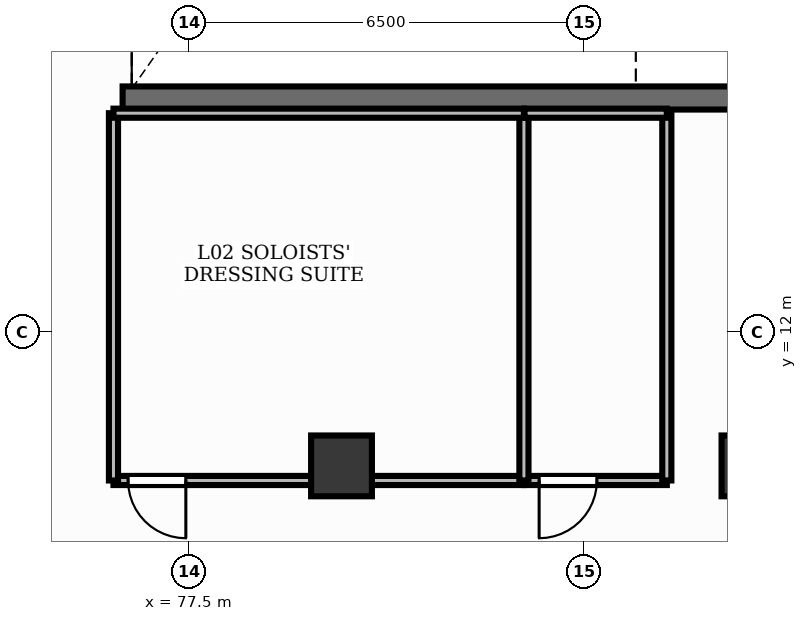
"""IFC4 building model, lengths in metres.
Left out: names, types, materials, properties, quantities, classifications, styles, units other than length and angle.
Written with IfcOpenShell. Run it as: python <this file> out.ifc"""

import sys

from ifc_helpers import new_model, si_unit, direction, frame, frame_2d, origin, origin_2d, place, context, subcontext, project, spatial, rectangle, extrude, element, fill, save


model = new_model("IFC4")
c1 = context("Model", 3, precision=1e-05, world=origin(), true_north=direction((0.0, 1.0)))
c2 = subcontext(c1, "Body", "Model", "MODEL_VIEW")
j1 = project(units=[si_unit("LENGTHUNIT", "METRE"), si_unit("PLANEANGLEUNIT", "RADIAN")], contexts=[c1])
p1 = place(None, origin())
s1 = spatial("IfcSite", under=j1, at=p1, CompositionType="ELEMENT")
p2 = place(p1, origin())
s2 = spatial("IfcBuilding", under=s1, at=p2, CompositionType="ELEMENT")
p3 = place(p2, frame((0.0, 0.0, 10.2)))
s3 = spatial("IfcBuildingStorey", under=s2, at=p3, CompositionType="ELEMENT", Elevation=10.2)
for number, where, z_axis, x_axis in (
    (1, (80.0, 9.8, 0.0), (0.0, 0.0, 1.0), (1.0, 0.0, 0.0)),
    (2, (86.75, 9.8, 0.0), (0.0, 0.0, 1.0), (1.0, 0.0, 0.0)),
):
    element("IfcColumn", number, at=place(p3, frame(where, z_axis=z_axis, x_axis=x_axis)), inside=s3, PredefinedType="COLUMN", context=c2, shape_type="SweptSolid", body=[
        extrude(rectangle(XDim=1.0, YDim=1.0, at=origin_2d()), origin(), (0.0, 0.0, 1.0), 4.5),
    ])
p4 = place(p3, frame((76.4, 15.85, 0.0), z_axis=(0.0, 0.0, 1.0), x_axis=(1.0, 0.0, 0.0)))
e3 = element("IfcWall", 3, at=p4, inside=s3, PredefinedType="SHEAR", context=c2, shape_type="SweptSolid", body=[
    extrude(rectangle(XDim=15.75, YDim=0.38, at=frame_2d((7.875, 0.0))), origin(), (0.0, 0.0, 1.0), 4.5),
])
p5 = place(p3, frame((83.0, 9.56, 0.0), z_axis=(0.0, 0.0, 1.0), x_axis=(-1.0, 0.0, 0.0)))
e4 = element("IfcWall", 4, at=p5, inside=s3, PredefinedType="PARTITIONING", context=c2, shape_type="SweptSolid", body=[
    extrude(rectangle(XDim=6.75, YDim=0.15, at=frame_2d((3.375, 0.0))), origin(), (0.0, 0.0, 1.0), 3.46),
])
p6 = place(p5, frame((5.56, 0.0, 0.0)))
e5 = element("IfcOpeningElement", 5, at=p6, cuts=e4, PredefinedType="OPENING", context=c2, shape_type="SweptSolid", body=[
    extrude(rectangle(XDim=0.95, YDim=2.15, at=frame_2d((0.475, 1.075))), frame((0.0, 0.09, 0.0), z_axis=(0.0, -1.0, 0.0), x_axis=(1.0, 0.0, 0.0)), (0.0, 0.0, 1.0), 0.18),
])
p7 = place(p3, frame((85.35, 9.56, 0.0), z_axis=(0.0, 0.0, 1.0), x_axis=(-1.0, 0.0, 0.0)))
e6 = element("IfcWall", 6, at=p7, inside=s3, PredefinedType="PARTITIONING", context=c2, shape_type="SweptSolid", body=[
    extrude(rectangle(XDim=2.34, YDim=0.15, at=frame_2d((1.17, 0.0))), origin(), (0.0, 0.0, 1.0), 3.46),
])
p8 = place(p7, frame((1.15, 0.0, 0.0)))
e7 = element("IfcOpeningElement", 7, at=p8, cuts=e6, PredefinedType="OPENING", context=c2, shape_type="SweptSolid", body=[
    extrude(rectangle(XDim=0.95, YDim=2.15, at=frame_2d((0.475, 1.075))), frame((0.0, 0.09, 0.0), z_axis=(0.0, -1.0, 0.0), x_axis=(1.0, 0.0, 0.0)), (0.0, 0.0, 1.0), 0.18),
])
for number, where, z_axis, x_axis in (
    (8, (83.0, 15.6, 0.0), (0.0, 0.0, 1.0), (0.0, -1.0, 0.0)),
    (9, (76.25, 9.56, 0.0), (0.0, 0.0, 1.0), (0.0, 1.0, 0.0)),
):
    element("IfcWall", number, at=place(p3, frame(where, z_axis=z_axis, x_axis=x_axis)), inside=s3, PredefinedType="PARTITIONING", context=c2, shape_type="SweptSolid", body=[
        extrude(rectangle(XDim=6.04, YDim=0.15, at=frame_2d((3.02, 0.0))), origin(), (0.0, 0.0, 1.0), 3.46),
    ])
p9 = place(p3, frame((76.25, 15.6, 0.0), z_axis=(0.0, 0.0, 1.0), x_axis=(1.0, 0.0, 0.0)))
e10 = element("IfcWall", 10, at=p9, inside=s3, PredefinedType="PARTITIONING", context=c2, shape_type="SweptSolid", body=[
    extrude(rectangle(XDim=6.75, YDim=0.15, at=frame_2d((3.375, 0.0))), origin(), (0.0, 0.0, 1.0), 3.46),
])
p10 = place(p3, frame((85.35, 15.6, 0.0), z_axis=(0.0, 0.0, 1.0), x_axis=(0.0, -1.0, 0.0)))
e11 = element("IfcWall", 11, at=p10, inside=s3, PredefinedType="PARTITIONING", context=c2, shape_type="SweptSolid", body=[
    extrude(rectangle(XDim=6.04, YDim=0.15, at=frame_2d((3.02, 0.0))), origin(), (0.0, 0.0, 1.0), 3.46),
])
p11 = place(p3, frame((83.01, 15.6, 0.0), z_axis=(0.0, 0.0, 1.0), x_axis=(1.0, 0.0, 0.0)))
e12 = element("IfcWall", 12, at=p11, inside=s3, PredefinedType="PARTITIONING", context=c2, shape_type="SweptSolid", body=[
    extrude(rectangle(XDim=2.34, YDim=0.15, at=frame_2d((1.17, 0.0))), origin(), (0.0, 0.0, 1.0), 3.46),
])
p12 = place(p6, origin())
e13 = element("IfcDoor", 13, at=p12, inside=s3, OperationType="SINGLE_SWING_LEFT", PredefinedType="DOOR", context=c2, shape_type="SweptSolid", body=[
    extrude(rectangle(XDim=0.95, YDim=2.15, at=frame_2d((0.475, 1.075))), frame((0.0, 0.025, 0.0), z_axis=(0.0, -1.0, 0.0), x_axis=(1.0, 0.0, 0.0)), (0.0, 0.0, 1.0), 0.05),
])
fill(e5, e13)
p13 = place(p8, origin())
e14 = element("IfcDoor", 14, at=p13, inside=s3, OperationType="SINGLE_SWING_RIGHT", PredefinedType="DOOR", context=c2, shape_type="SweptSolid", body=[
    extrude(rectangle(XDim=0.95, YDim=2.15, at=frame_2d((0.475, 1.075))), frame((0.0, 0.025, 0.0), z_axis=(0.0, -1.0, 0.0), x_axis=(1.0, 0.0, 0.0)), (0.0, 0.0, 1.0), 0.05),
])
fill(e7, e14)
save(model, sys.argv[1])
